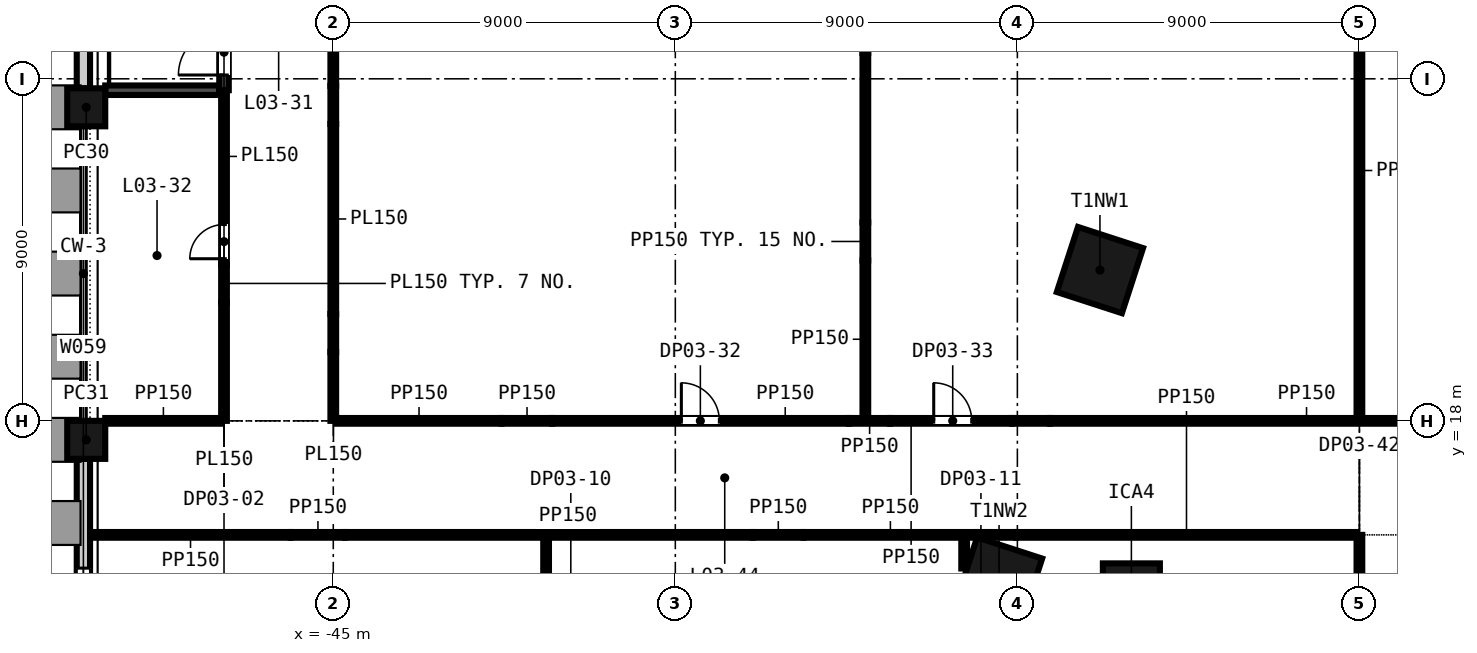
"""IFC4 building model, lengths in metres.
Left out: names, types, materials, properties, quantities, classifications, styles, units other than length and angle.
Written with IfcOpenShell. Run it as: python <this file> out.ifc"""

import sys

from ifc_helpers import new_model, si_unit, direction, frame, frame_2d, origin, origin_2d, place, context, subcontext, project, spatial, rectangle, extrude, element, fill, save


model = new_model("IFC4")
c1 = context("Model", 3, precision=1e-05, world=origin(), true_north=direction((0.0, 1.0)))
c2 = subcontext(c1, "Body", "Model", "MODEL_VIEW")
j1 = project(units=[si_unit("LENGTHUNIT", "METRE"), si_unit("PLANEANGLEUNIT", "RADIAN")], contexts=[c1])
p1 = place(None, origin())
s1 = spatial("IfcSite", under=j1, at=p1, CompositionType="ELEMENT")
p2 = place(p1, origin())
s2 = spatial("IfcBuilding", under=s1, at=p2, CompositionType="ELEMENT")
p3 = place(p2, frame((0.0, 0.0, 22.5)))
s3 = spatial("IfcBuildingStorey", under=s2, at=p3, CompositionType="ELEMENT", Elevation=22.5)
for number, where, z_axis, x_axis in (
    (1, (-24.827, 21.968, -0.3), (0.0, 0.0, 1.0), (-0.309, -0.951, 0.0)),
    (2, (-27.482, 13.799, -0.3), (0.0, 0.0, 1.0), (-0.309, -0.951, 0.0)),
):
    element("IfcColumn", number, at=place(p3, frame(where, z_axis=z_axis, x_axis=x_axis)), inside=s3, PredefinedType="COLUMN", context=c2, shape_type="SweptSolid", body=[
        extrude(rectangle(XDim=1.8, YDim=1.8, at=origin_2d()), origin(), (0.0, 0.0, 1.0), 4.5),
    ])
p4 = place(p3, frame((-24.0, 13.5, -0.3), z_axis=(0.0, 0.0, 1.0), x_axis=(1.0, 0.0, 0.0)))
e3 = element("IfcColumn", 3, at=p4, inside=s3, PredefinedType="COLUMN", context=c2, shape_type="SweptSolid", body=[
    extrude(rectangle(XDim=1.5, YDim=1.5, at=origin_2d()), origin(), (0.0, 0.0, 1.0), 4.5),
])
for number, where, z_axis, x_axis in (
    (4, (-51.5, 26.25, -0.3), (0.0, 0.0, 1.0), (0.0, -1.0, 0.0)),
    (5, (-51.5, 17.5, -0.3), (0.0, 0.0, 1.0), (0.0, -1.0, 0.0)),
):
    element("IfcColumn", number, at=place(p3, frame(where, z_axis=z_axis, x_axis=x_axis)), inside=s3, PredefinedType="COLUMN", context=c2, shape_type="SweptSolid", body=[
        extrude(rectangle(XDim=1.0, YDim=1.0, at=origin_2d()), origin(), (0.0, 0.0, 1.0), 4.5),
    ])
p5 = place(p3, frame((-51.575, 34.0, -0.3), z_axis=(0.0, 0.0, 1.0), x_axis=(0.0, -1.0, 0.0)))
e6 = element("IfcWall", 6, at=p5, inside=s3, PredefinedType="SOLIDWALL", context=c2, shape_type="SweptSolid", body=[
    extrude(rectangle(XDim=7.25, YDim=0.35, at=frame_2d((3.625, 0.0))), origin(), (0.0, 0.0, 1.0), 3.6),
])
p6 = place(p5, frame((2.625, 0.0, 1.2)))
e7 = element("IfcOpeningElement", 7, at=p6, cuts=e6, PredefinedType="OPENING", context=c2, shape_type="SweptSolid", body=[
    extrude(rectangle(XDim=2.0, YDim=2.35, at=frame_2d((1.0, 1.175))), frame((0.0, 0.185, 0.0), z_axis=(0.0, -1.0, 0.0), x_axis=(1.0, 0.0, 0.0)), (0.0, 0.0, 1.0), 0.37),
])
p7 = place(p3, frame((-51.575, 17.0, -0.3), z_axis=(0.0, 0.0, 1.0), x_axis=(0.0, -1.0, 0.0)))
e8 = element("IfcWall", 8, at=p7, inside=s3, PredefinedType="SOLIDWALL", context=c2, shape_type="SweptSolid", body=[
    extrude(rectangle(XDim=7.75, YDim=0.35, at=frame_2d((3.875, 0.0))), origin(), (0.0, 0.0, 1.0), 3.6),
])
p8 = place(p7, frame((2.875, 0.0, 1.2)))
e9 = element("IfcOpeningElement", 9, at=p8, cuts=e8, PredefinedType="OPENING", context=c2, shape_type="SweptSolid", body=[
    extrude(rectangle(XDim=2.0, YDim=2.35, at=frame_2d((1.0, 1.175))), frame((0.0, 0.185, 0.0), z_axis=(0.0, -1.0, 0.0), x_axis=(1.0, 0.0, 0.0)), (0.0, 0.0, 1.0), 0.37),
])
p9 = place(p3, frame((-51.4, 15.0, 0.0), z_axis=(0.0, 0.0, 1.0), x_axis=(1.0, 0.0, 0.0)))
e10 = element("IfcWall", 10, at=p9, inside=s3, PredefinedType="PARTITIONING", context=c2, shape_type="SweptSolid", body=[
    extrude(rectangle(XDim=5.277, YDim=0.15, at=frame_2d((2.639, 0.0))), origin(), (0.0, 0.0, 1.0), 4.2),
])
p10 = place(p3, frame((-46.123, 15.0, 0.0), z_axis=(0.0, 0.0, 1.0), x_axis=(1.0, 0.0, 0.0)))
e11 = element("IfcWall", 11, at=p10, inside=s3, PredefinedType="PARTITIONING", context=c2, shape_type="SweptSolid", body=[
    extrude(rectangle(XDim=1.428, YDim=0.15, at=frame_2d((0.714, 0.0))), origin(), (0.0, 0.0, 1.0), 3.219),
])
p11 = place(p3, frame((-44.695, 15.0, 0.0), z_axis=(0.0, 0.0, 1.0), x_axis=(1.0, 0.0, 0.0)))
e12 = element("IfcWall", 12, at=p11, inside=s3, PredefinedType="PARTITIONING", context=c2, shape_type="SweptSolid", body=[
    extrude(rectangle(XDim=10.734, YDim=0.15, at=frame_2d((5.367, 0.0))), origin(), (0.0, 0.0, 1.0), 4.2),
])
p12 = place(p3, frame((-33.961, 15.0, 0.0), z_axis=(0.0, 0.0, 1.0), x_axis=(1.0, 0.0, 0.0)))
e13 = element("IfcWall", 13, at=p12, inside=s3, PredefinedType="PARTITIONING", context=c2, shape_type="SweptSolid", body=[
    extrude(rectangle(XDim=1.331, YDim=0.15, at=frame_2d((0.666, 0.0))), origin(), (0.0, 0.0, 1.0), 3.111),
])
p13 = place(p3, frame((-32.63, 15.0, 0.0), z_axis=(0.0, 0.0, 1.0), x_axis=(1.0, 0.0, 0.0)))
e14 = element("IfcWall", 14, at=p13, inside=s3, PredefinedType="PARTITIONING", context=c2, shape_type="SweptSolid", body=[
    extrude(rectangle(XDim=4.568, YDim=0.15, at=frame_2d((2.284, 0.0))), origin(), (0.0, 0.0, 1.0), 4.2),
])
p14 = place(p3, frame((-28.035, 15.0, 0.0), z_axis=(0.0, 0.0, 1.0), x_axis=(1.0, 0.0, 0.0)))
e15 = element("IfcWall", 15, at=p14, inside=s3, PredefinedType="PARTITIONING", context=c2, shape_type="SweptSolid", body=[
    extrude(rectangle(XDim=1.0, YDim=0.15, at=frame_2d((0.5, 0.0))), origin(), (0.0, 0.0, 1.0), 3.2),
])
p15 = place(p3, frame((-27.035, 15.0, 0.0), z_axis=(0.0, 0.0, 1.0), x_axis=(1.0, 0.0, 0.0)))
e16 = element("IfcWall", 16, at=p15, inside=s3, PredefinedType="PARTITIONING", context=c2, shape_type="SweptSolid", body=[
    extrude(rectangle(XDim=8.96, YDim=0.15, at=frame_2d((4.48, 0.0))), origin(), (0.0, 0.0, 1.0), 4.2),
])
p16 = place(p3, frame((-51.0, 18.0, 0.0), z_axis=(0.0, 0.0, 1.0), x_axis=(1.0, 0.0, 0.0)))
e17 = element("IfcWall", 17, at=p16, inside=s3, PredefinedType="PARTITIONING", context=c2, shape_type="SweptSolid", body=[
    extrude(rectangle(XDim=3.05, YDim=0.15, at=frame_2d((1.525, 0.0))), origin(), (0.0, 0.0, 1.0), 4.2),
])
p17 = place(p3, frame((-44.925, 18.0, 0.0), z_axis=(0.0, 0.0, 1.0), x_axis=(1.0, 0.0, 0.0)))
e18 = element("IfcWall", 18, at=p17, inside=s3, PredefinedType="PARTITIONING", context=c2, shape_type="SweptSolid", body=[
    extrude(rectangle(XDim=4.353, YDim=0.15, at=frame_2d((2.176, 0.0))), origin(), (0.0, 0.0, 1.0), 4.2),
])
p18 = place(p3, frame((-40.572, 18.0, 0.0), z_axis=(0.0, 0.0, 1.0), x_axis=(1.0, 0.0, 0.0)))
e19 = element("IfcWall", 19, at=p18, inside=s3, PredefinedType="PARTITIONING", context=c2, shape_type="SweptSolid", body=[
    extrude(rectangle(XDim=1.331, YDim=0.15, at=frame_2d((0.666, 0.0))), origin(), (0.0, 0.0, 1.0), 3.111),
])
p19 = place(p3, frame((-39.241, 18.0, 0.0), z_axis=(0.0, 0.0, 1.0), x_axis=(1.0, 0.0, 0.0)))
e20 = element("IfcWall", 20, at=p19, inside=s3, PredefinedType="PARTITIONING", context=c2, shape_type="SweptSolid", body=[
    extrude(rectangle(XDim=7.807, YDim=0.15, at=frame_2d((3.903, 0.0))), origin(), (0.0, 0.0, 1.0), 4.2),
])
p20 = place(p19, frame((3.4, 0.0, 0.0)))
e21 = element("IfcOpeningElement", 21, at=p20, cuts=e20, PredefinedType="OPENING", context=c2, shape_type="SweptSolid", body=[
    extrude(rectangle(XDim=1.0, YDim=2.1, at=frame_2d((0.5, 1.05))), frame((0.0, 0.085, 0.0), z_axis=(0.0, -1.0, 0.0), x_axis=(1.0, 0.0, 0.0)), (0.0, 0.0, 1.0), 0.17),
])
p21 = place(p3, frame((-31.434, 18.0, 0.0), z_axis=(0.0, 0.0, 1.0), x_axis=(1.0, 0.0, 0.0)))
e22 = element("IfcWall", 22, at=p21, inside=s3, PredefinedType="PARTITIONING", context=c2, shape_type="SweptSolid", body=[
    extrude(rectangle(XDim=1.083, YDim=0.15, at=frame_2d((0.542, 0.0))), origin(), (0.0, 0.0, 1.0), 3.111),
])
p22 = place(p3, frame((-30.351, 18.0, 0.0), z_axis=(0.0, 0.0, 1.0), x_axis=(1.0, 0.0, 0.0)))
e23 = element("IfcWall", 23, at=p22, inside=s3, PredefinedType="PARTITIONING", context=c2, shape_type="SweptSolid", body=[
    extrude(rectangle(XDim=3.209, YDim=0.15, at=frame_2d((1.604, 0.0))), origin(), (0.0, 0.0, 1.0), 4.2),
])
p23 = place(p22, frame((1.15, 0.0, 0.0)))
e24 = element("IfcOpeningElement", 24, at=p23, cuts=e23, PredefinedType="OPENING", context=c2, shape_type="SweptSolid", body=[
    extrude(rectangle(XDim=1.0, YDim=2.1, at=frame_2d((0.5, 1.05))), frame((0.0, 0.085, 0.0), z_axis=(0.0, -1.0, 0.0), x_axis=(1.0, 0.0, 0.0)), (0.0, 0.0, 1.0), 0.17),
])
p24 = place(p3, frame((-27.142, 18.0, 0.0), z_axis=(0.0, 0.0, 1.0), x_axis=(1.0, 0.0, 0.0)))
e25 = element("IfcWall", 25, at=p24, inside=s3, PredefinedType="PARTITIONING", context=c2, shape_type="SweptSolid", body=[
    extrude(rectangle(XDim=1.0, YDim=0.15, at=frame_2d((0.5, 0.0))), origin(), (0.0, 0.0, 1.0), 3.2),
])
p25 = place(p3, frame((-26.142, 18.0, 0.0), z_axis=(0.0, 0.0, 1.0), x_axis=(1.0, 0.0, 0.0)))
e26 = element("IfcWall", 26, at=p25, inside=s3, PredefinedType="PARTITIONING", context=c2, shape_type="SweptSolid", body=[
    extrude(rectangle(XDim=44.067, YDim=0.15, at=frame_2d((22.034, 0.0))), origin(), (0.0, 0.0, 1.0), 4.2),
])
p26 = place(p25, frame((13.542, 0.0, 0.0)))
e27 = element("IfcOpeningElement", 27, at=p26, cuts=e26, PredefinedType="OPENING", context=c2, shape_type="SweptSolid", body=[
    extrude(rectangle(XDim=1.0, YDim=2.1, at=frame_2d((0.5, 1.05))), frame((0.0, 0.085, 0.0), z_axis=(0.0, -1.0, 0.0), x_axis=(1.0, 0.0, 0.0)), (0.0, 0.0, 1.0), 0.17),
])
p27 = place(p25, frame((25.542, 0.0, 0.0)))
e28 = element("IfcOpeningElement", 28, at=p27, cuts=e26, PredefinedType="OPENING", context=c2, shape_type="SweptSolid", body=[
    extrude(rectangle(XDim=1.0, YDim=2.1, at=frame_2d((0.5, 1.05))), frame((0.0, 0.085, 0.0), z_axis=(0.0, -1.0, 0.0), x_axis=(1.0, 0.0, 0.0)), (0.0, 0.0, 1.0), 0.17),
])
p28 = place(p25, frame((37.542, 0.0, 0.0)))
e29 = element("IfcOpeningElement", 29, at=p28, cuts=e26, PredefinedType="OPENING", context=c2, shape_type="SweptSolid", body=[
    extrude(rectangle(XDim=1.0, YDim=2.1, at=frame_2d((0.5, 1.05))), frame((0.0, 0.085, 0.0), z_axis=(0.0, -1.0, 0.0), x_axis=(1.0, 0.0, 0.0)), (0.0, 0.0, 1.0), 0.17),
])
p29 = place(p3, frame((-51.0, 26.7, 0.0), z_axis=(0.0, 0.0, 1.0), x_axis=(1.0, 0.0, 0.0)))
e30 = element("IfcWall", 30, at=p29, inside=s3, PredefinedType="SHEAR", context=c2, shape_type="SweptSolid", body=[
    extrude(rectangle(XDim=3.0, YDim=0.25, at=frame_2d((1.5, 0.0))), origin(), (0.0, 0.0, 1.0), 4.2),
])
p30 = place(p3, frame((-47.875, 18.0, 0.0), z_axis=(0.0, 0.0, 1.0), x_axis=(0.0, 1.0, 0.0)))
e31 = element("IfcWall", 31, at=p30, inside=s3, PredefinedType="PARTITIONING", context=c2, shape_type="SweptSolid", body=[
    extrude(rectangle(XDim=3.116, YDim=0.15, at=frame_2d((1.558, 0.0))), origin(), (0.0, 0.0, 1.0), 4.2),
])
p31 = place(p3, frame((-47.875, 21.116, 0.0), z_axis=(0.0, 0.0, 1.0), x_axis=(0.0, 1.0, 0.0)))
e32 = element("IfcWall", 32, at=p31, inside=s3, PredefinedType="PARTITIONING", context=c2, shape_type="SweptSolid", body=[
    extrude(rectangle(XDim=1.0, YDim=0.15, at=frame_2d((0.5, 0.0))), origin(), (0.0, 0.0, 1.0), 3.111),
])
p32 = place(p3, frame((-47.875, 22.116, 0.0), z_axis=(0.0, 0.0, 1.0), x_axis=(0.0, 1.0, 0.0)))
e33 = element("IfcWall", 33, at=p32, inside=s3, PredefinedType="PARTITIONING", context=c2, shape_type="SweptSolid", body=[
    extrude(rectangle(XDim=4.584, YDim=0.15, at=frame_2d((2.292, 0.0))), origin(), (0.0, 0.0, 1.0), 4.2),
])
p33 = place(p32, frame((0.15, 0.0, 0.0)))
e34 = element("IfcOpeningElement", 34, at=p33, cuts=e33, PredefinedType="OPENING", context=c2, shape_type="SweptSolid", body=[
    extrude(rectangle(XDim=0.9, YDim=2.1, at=frame_2d((0.45, 1.05))), frame((0.0, 0.085, 0.0), z_axis=(0.0, -1.0, 0.0), x_axis=(1.0, 0.0, 0.0)), (0.0, 0.0, 1.0), 0.17),
])
p34 = place(p3, frame((-47.875, 26.7, 0.0), z_axis=(0.0, 0.0, 1.0), x_axis=(0.0, 1.0, 0.0)))
e35 = element("IfcWall", 35, at=p34, inside=s3, PredefinedType="SHEAR", context=c2, shape_type="SweptSolid", body=[
    extrude(rectangle(XDim=7.9, YDim=0.25, at=frame_2d((3.95, 0.0))), origin(), (0.0, 0.0, 1.0), 4.2),
])
p35 = place(p34, frame((0.4, 0.0, 0.0)))
e36 = element("IfcOpeningElement", 36, at=p35, cuts=e35, PredefinedType="OPENING", context=c2, shape_type="SweptSolid", body=[
    extrude(rectangle(XDim=1.2, YDim=2.1, at=frame_2d((0.6, 1.05))), frame((0.0, 0.135, 0.0), z_axis=(0.0, -1.0, 0.0), x_axis=(1.0, 0.0, 0.0)), (0.0, 0.0, 1.0), 0.27),
])
p36 = place(p3, frame((-45.0, 18.0, 0.0), z_axis=(0.0, 0.0, 1.0), x_axis=(0.0, 1.0, 0.0)))
e37 = element("IfcWall", 37, at=p36, inside=s3, PredefinedType="PARTITIONING", context=c2, shape_type="SweptSolid", body=[
    extrude(rectangle(XDim=1.811, YDim=0.15, at=frame_2d((0.906, 0.0))), origin(), (0.0, 0.0, 1.0), 4.2),
])
p37 = place(p3, frame((-45.0, 19.811, 0.0), z_axis=(0.0, 0.0, 1.0), x_axis=(0.0, 1.0, 0.0)))
e38 = element("IfcWall", 38, at=p37, inside=s3, PredefinedType="PARTITIONING", context=c2, shape_type="SweptSolid", body=[
    extrude(rectangle(XDim=1.0, YDim=0.15, at=frame_2d((0.5, 0.0))), origin(), (0.0, 0.0, 1.0), 3.111),
])
p38 = place(p3, frame((-45.0, 20.811, 0.0), z_axis=(0.0, 0.0, 1.0), x_axis=(0.0, 1.0, 0.0)))
e39 = element("IfcWall", 39, at=p38, inside=s3, PredefinedType="PARTITIONING", context=c2, shape_type="SweptSolid", body=[
    extrude(rectangle(XDim=5.002, YDim=0.15, at=frame_2d((2.501, 0.0))), origin(), (0.0, 0.0, 1.0), 4.2),
])
p39 = place(p3, frame((-45.0, 25.813, 0.0), z_axis=(0.0, 0.0, 1.0), x_axis=(0.0, 1.0, 0.0)))
e40 = element("IfcWall", 40, at=p39, inside=s3, PredefinedType="PARTITIONING", context=c2, shape_type="SweptSolid", body=[
    extrude(rectangle(XDim=1.0, YDim=0.15, at=frame_2d((0.5, 0.0))), origin(), (0.0, 0.0, 1.0), 3.111),
])
p40 = place(p3, frame((-45.0, 26.813, 0.0), z_axis=(0.0, 0.0, 1.0), x_axis=(0.0, 1.0, 0.0)))
e41 = element("IfcWall", 41, at=p40, inside=s3, PredefinedType="PARTITIONING", context=c2, shape_type="SweptSolid", body=[
    extrude(rectangle(XDim=5.808, YDim=0.15, at=frame_2d((2.904, 0.0))), origin(), (0.0, 0.0, 1.0), 4.2),
])
p41 = place(p40, frame((2.4, 0.0, 0.0)))
e42 = element("IfcOpeningElement", 42, at=p41, cuts=e41, PredefinedType="OPENING", context=c2, shape_type="SweptSolid", body=[
    extrude(rectangle(XDim=1.0, YDim=2.1, at=frame_2d((0.5, 1.05))), frame((0.0, 0.085, 0.0), z_axis=(0.0, -1.0, 0.0), x_axis=(1.0, 0.0, 0.0)), (0.0, 0.0, 1.0), 0.17),
])
p42 = place(p3, frame((-39.4, 1.326, 0.0), z_axis=(0.0, 0.0, 1.0), x_axis=(0.0, 1.0, 0.0)))
e43 = element("IfcWall", 43, at=p42, inside=s3, PredefinedType="PARTITIONING", context=c2, shape_type="SweptSolid", body=[
    extrude(rectangle(XDim=13.599, YDim=0.15, at=frame_2d((6.8, 0.0))), origin(), (0.0, 0.0, 1.0), 4.2),
])
p43 = place(p3, frame((-31.0, 18.075, 0.0), z_axis=(0.0, 0.0, 1.0), x_axis=(0.0, 1.0, 0.0)))
e44 = element("IfcWall", 44, at=p43, inside=s3, PredefinedType="PARTITIONING", context=c2, shape_type="SweptSolid", body=[
    extrude(rectangle(XDim=4.145, YDim=0.15, at=frame_2d((2.073, 0.0))), origin(), (0.0, 0.0, 1.0), 4.2),
])
p44 = place(p3, frame((-31.0, 22.22, 0.0), z_axis=(0.0, 0.0, 1.0), x_axis=(0.0, 1.0, 0.0)))
e45 = element("IfcWall", 45, at=p44, inside=s3, PredefinedType="PARTITIONING", context=c2, shape_type="SweptSolid", body=[
    extrude(rectangle(XDim=1.0, YDim=0.15, at=frame_2d((0.5, 0.0))), origin(), (0.0, 0.0, 1.0), 3.111),
])
p45 = place(p3, frame((-31.0, 23.22, 0.0), z_axis=(0.0, 0.0, 1.0), x_axis=(0.0, 1.0, 0.0)))
e46 = element("IfcWall", 46, at=p45, inside=s3, PredefinedType="PARTITIONING", context=c2, shape_type="SweptSolid", body=[
    extrude(rectangle(XDim=4.46, YDim=0.15, at=frame_2d((2.23, 0.0))), origin(), (0.0, 0.0, 1.0), 4.2),
])
p46 = place(p3, frame((-31.0, 27.68, 0.0), z_axis=(0.0, 0.0, 1.0), x_axis=(0.0, 1.0, 0.0)))
e47 = element("IfcWall", 47, at=p46, inside=s3, PredefinedType="PARTITIONING", context=c2, shape_type="SweptSolid", body=[
    extrude(rectangle(XDim=1.0, YDim=0.15, at=frame_2d((0.5, 0.0))), origin(), (0.0, 0.0, 1.0), 3.111),
])
p47 = place(p3, frame((-28.4, 14.116, 0.0), z_axis=(0.0, 0.0, 1.0), x_axis=(0.0, 1.0, 0.0)))
e48 = element("IfcWall", 48, at=p47, inside=s3, PredefinedType="PARTITIONING", context=c2, shape_type="SweptSolid", body=[
    extrude(rectangle(XDim=0.809, YDim=0.15, at=frame_2d((0.405, 0.0))), origin(), (0.0, 0.0, 1.0), 4.2),
])
p48 = place(p3, frame((-18.0, 1.251, 0.0), z_axis=(0.0, 0.0, 1.0), x_axis=(0.0, 1.0, 0.0)))
e49 = element("IfcWall", 49, at=p48, inside=s3, PredefinedType="PARTITIONING", context=c2, shape_type="SweptSolid", body=[
    extrude(rectangle(XDim=13.749, YDim=0.15, at=frame_2d((6.875, 0.0))), origin(), (0.0, 0.0, 1.0), 4.2),
])
p49 = place(p48, frame((6.4, 0.0, 0.0)))
e50 = element("IfcOpeningElement", 50, at=p49, cuts=e49, PredefinedType="OPENING", context=c2, shape_type="SweptSolid", body=[
    extrude(rectangle(XDim=1.0, YDim=2.1, at=frame_2d((0.5, 1.05))), frame((0.0, 0.085, 0.0), z_axis=(0.0, -1.0, 0.0), x_axis=(1.0, 0.0, 0.0)), (0.0, 0.0, 1.0), 0.17),
])
p50 = place(p3, frame((-18.0, 18.075, 0.0), z_axis=(0.0, 0.0, 1.0), x_axis=(0.0, 1.0, 0.0)))
e51 = element("IfcWall", 51, at=p50, inside=s3, PredefinedType="PARTITIONING", context=c2, shape_type="SweptSolid", body=[
    extrude(rectangle(XDim=13.025, YDim=0.15, at=frame_2d((6.513, 0.0))), origin(), (0.0, 0.0, 1.0), 4.2),
])
p51 = place(p8, origin())
e52 = element("IfcWindow", 52, at=p51, inside=s3, PartitioningType="SINGLE_PANEL", PredefinedType="WINDOW", context=c2, shape_type="SweptSolid", body=[
    extrude(rectangle(XDim=2.0, YDim=2.35, at=frame_2d((1.0, 1.175))), frame((0.0, 0.03, 0.0), z_axis=(0.0, -1.0, 0.0), x_axis=(1.0, 0.0, 0.0)), (0.0, 0.0, 1.0), 0.06),
])
fill(e9, e52)
p52 = place(p35, origin())
e53 = element("IfcDoor", 53, at=p52, inside=s3, OperationType="SINGLE_SWING_LEFT", PredefinedType="DOOR", context=c2, shape_type="SweptSolid", body=[
    extrude(rectangle(XDim=1.2, YDim=2.1, at=frame_2d((0.6, 1.05))), frame((0.0, 0.025, 0.0), z_axis=(0.0, -1.0, 0.0), x_axis=(1.0, 0.0, 0.0)), (0.0, 0.0, 1.0), 0.05),
])
fill(e36, e53)
p53 = place(p33, origin())
e54 = element("IfcDoor", 54, at=p53, inside=s3, OperationType="SINGLE_SWING_LEFT", PredefinedType="DOOR", context=c2, shape_type="SweptSolid", body=[
    extrude(rectangle(XDim=0.9, YDim=2.1, at=frame_2d((0.45, 1.05))), frame((0.0, 0.025, 0.0), z_axis=(0.0, -1.0, 0.0), x_axis=(1.0, 0.0, 0.0)), (0.0, 0.0, 1.0), 0.05),
])
fill(e34, e54)
p54 = place(p20, origin())
e55 = element("IfcDoor", 55, at=p54, inside=s3, OperationType="SINGLE_SWING_LEFT", PredefinedType="DOOR", context=c2, shape_type="SweptSolid", body=[
    extrude(rectangle(XDim=1.0, YDim=2.1, at=frame_2d((0.5, 1.05))), frame((0.0, 0.025, 0.0), z_axis=(0.0, -1.0, 0.0), x_axis=(1.0, 0.0, 0.0)), (0.0, 0.0, 1.0), 0.05),
])
fill(e21, e55)
p55 = place(p23, origin())
e56 = element("IfcDoor", 56, at=p55, inside=s3, OperationType="SINGLE_SWING_LEFT", PredefinedType="DOOR", context=c2, shape_type="SweptSolid", body=[
    extrude(rectangle(XDim=1.0, YDim=2.1, at=frame_2d((0.5, 1.05))), frame((0.0, 0.025, 0.0), z_axis=(0.0, -1.0, 0.0), x_axis=(1.0, 0.0, 0.0)), (0.0, 0.0, 1.0), 0.05),
])
fill(e24, e56)
save(model, sys.argv[1])
